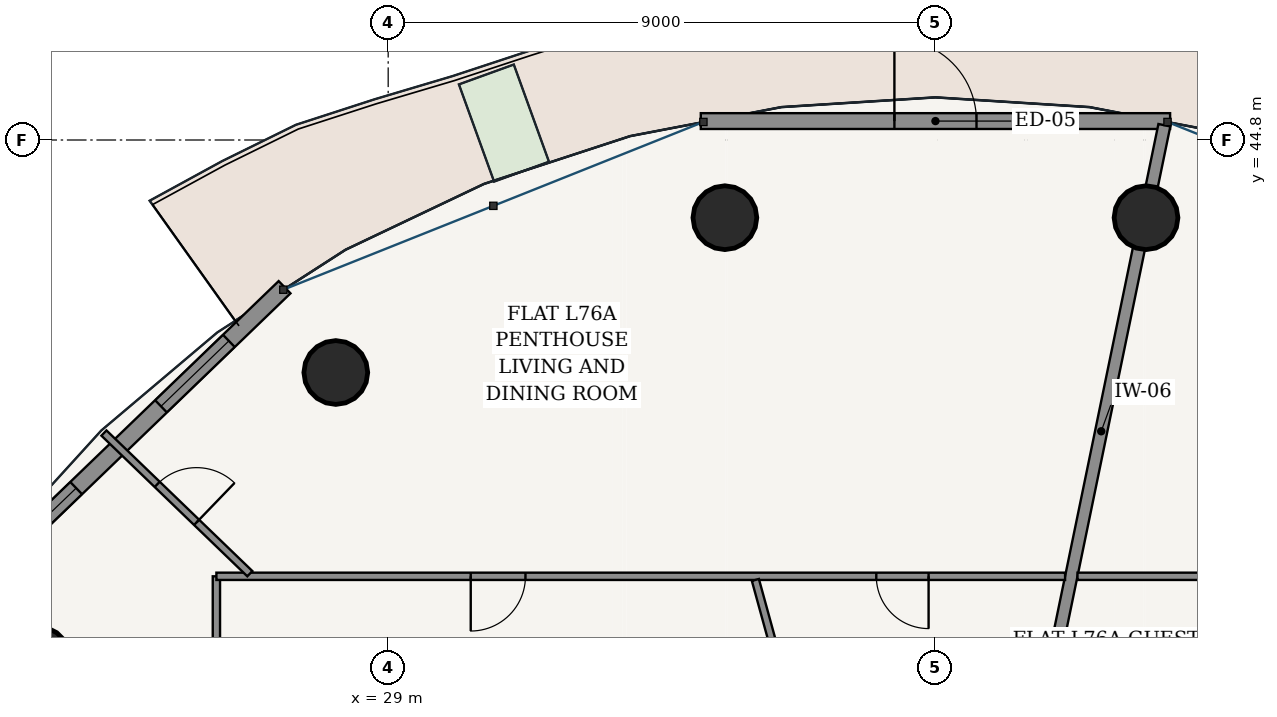
"""IFC4 building model, lengths in metres.
Left out: names, types, materials, properties, quantities, classifications, styles, units other than length and angle.
Written with IfcOpenShell. Run it as: python <this file> out.ifc"""

import sys

from ifc_helpers import new_model, si_unit, direction, frame, frame_2d, origin, origin_2d, place, context, subcontext, project, spatial, rectangle, hollow_circle, extrude, source, transform, mapped, element, fill, save


model = new_model("IFC4")
c1 = context("Model", 3, precision=1e-05, world=origin(), true_north=direction((-0.2419218956, 0.970295726276)))
c2 = subcontext(c1, "Body", "Model", "MODEL_VIEW")
j1 = project(units=[si_unit("LENGTHUNIT", "METRE"), si_unit("PLANEANGLEUNIT", "RADIAN")], contexts=[c1])
p1 = place(None, origin())
s1 = spatial("IfcSite", under=j1, at=p1, CompositionType="ELEMENT")
p2 = place(p1, origin())
s2 = spatial("IfcBuilding", under=s1, at=p2, CompositionType="ELEMENT")
p3 = place(p2, frame((0.0, 0.0, 289.45)))
s3 = spatial("IfcBuildingStorey", under=s2, at=p3, CompositionType="ELEMENT", Elevation=289.45)
for number, where, z_axis, x_axis in (
    (1, (41.463, 43.522, 0.0), (0.0, 0.0, 1.0), (1.0, 0.0, 0.0)),
    (2, (34.537, 43.522, 0.0), (0.0, 0.0, 1.0), (1.0, 0.0, 0.0)),
    (3, (28.139, 40.977, 0.0), (0.0, 0.0, 1.0), (1.0, 0.0, 0.0)),
    (4, (23.241, 36.272, 0.0), (0.0, 0.0, 1.0), (1.0, 0.0, 0.0)),
):
    element("IfcColumn", number, at=place(p3, frame(where, z_axis=z_axis, x_axis=x_axis)), inside=s3, PredefinedType="COLUMN", context=c2, shape_type="SweptSolid", body=[
        extrude(hollow_circle(Radius=0.525, WallThickness=0.035, at=origin_2d()), origin(), (0.0, 0.0, 1.0), 3.75),
    ])
p4 = place(p3, frame((41.859, 45.111, 0.0), z_axis=(0.0, 0.0, 1.0), x_axis=(-1.0, 0.0, 0.0)))
e5 = element("IfcWall", 5, at=p4, inside=s3, PredefinedType="SOLIDWALL", context=c2, shape_type="SweptSolid", body=[
    extrude(rectangle(XDim=7.718, YDim=0.26, at=frame_2d((3.859, 0.0))), origin(), (0.0, 0.0, 1.0), 3.49),
])
p5 = place(p4, frame((3.184, 0.0, 0.0)))
e6 = element("IfcOpeningElement", 6, at=p5, cuts=e5, PredefinedType="OPENING", context=c2, shape_type="SweptSolid", body=[
    extrude(rectangle(XDim=1.35, YDim=2.2, at=frame_2d((0.675, 1.1))), frame((0.0, 0.14, 0.0), z_axis=(0.0, -1.0, 0.0), x_axis=(1.0, 0.0, 0.0)), (0.0, 0.0, 1.0), 0.28),
])
p6 = place(p3, frame((27.296, 42.379, 0.0), z_axis=(0.0, 0.0, 1.0), x_axis=(-0.719979309073, -0.693995529169, 0.0)))
e7 = element("IfcWall", 7, at=p6, inside=s3, PredefinedType="SOLIDWALL", context=c2, shape_type="SweptSolid", body=[
    extrude(rectangle(XDim=7.583, YDim=0.28, at=frame_2d((3.791, 0.0))), origin(), (0.0, 0.0, 1.0), 3.49),
])
p7 = place(p6, frame((1.272, 0.0, 0.85)))
e8 = element("IfcOpeningElement", 8, at=p7, cuts=e7, PredefinedType="OPENING", context=c2, shape_type="SweptSolid", body=[
    extrude(rectangle(XDim=1.55, YDim=1.95, at=frame_2d((0.775, 0.975))), frame((0.0, 0.15, 0.0), z_axis=(0.0, -1.0, 0.0), x_axis=(1.0, 0.0, 0.0)), (0.0, 0.0, 1.0), 0.3),
])
p8 = place(p6, frame((4.76, 0.0, 0.85)))
e9 = element("IfcOpeningElement", 9, at=p8, cuts=e7, PredefinedType="OPENING", context=c2, shape_type="SweptSolid", body=[
    extrude(rectangle(XDim=1.55, YDim=1.95, at=frame_2d((0.775, 0.975))), frame((0.0, 0.15, 0.0), z_axis=(0.0, -1.0, 0.0), x_axis=(1.0, 0.0, 0.0)), (0.0, 0.0, 1.0), 0.3),
])
p9 = place(p3, frame((39.688, 34.977, 0.0), z_axis=(0.0, 0.0, 1.0), x_axis=(0.202091890364, 0.979366564596, 0.0)))
e10 = element("IfcWall", 10, at=p9, inside=s3, PredefinedType="PARTITIONING", context=c2, shape_type="SweptSolid", body=[
    extrude(rectangle(XDim=10.278, YDim=0.2, at=frame_2d((5.139, 0.0))), origin(), (0.0, 0.0, 1.0), 2.575),
])
p10 = place(p3, frame((26.175, 34.01, 0.0), z_axis=(0.0, 0.0, 1.0), x_axis=(0.0, 1.0, 0.0)))
e11 = element("IfcWall", 11, at=p10, inside=s3, PredefinedType="PARTITIONING", context=c2, shape_type="SweptSolid", body=[
    extrude(rectangle(XDim=3.615, YDim=0.12, at=frame_2d((1.808, 0.0))), origin(), (0.0, 0.0, 1.0), 3.015),
])
p11 = place(p3, frame((26.175, 37.625, 0.0), z_axis=(0.0, 0.0, 1.0), x_axis=(1.0, 0.0, 0.0)))
e12 = element("IfcWall", 12, at=p11, inside=s3, PredefinedType="PARTITIONING", context=c2, shape_type="SweptSolid", body=[
    extrude(rectangle(XDim=13.957, YDim=0.12, at=frame_2d((6.979, 0.0))), origin(), (0.0, 0.0, 1.0), 3.015),
])
p12 = place(p11, frame((10.852, 0.0, 0.0)))
e13 = element("IfcOpeningElement", 13, at=p12, cuts=e12, PredefinedType="OPENING", context=c2, shape_type="SweptSolid", body=[
    extrude(rectangle(XDim=0.86, YDim=2.15, at=frame_2d((0.43, 1.075))), frame((0.0, 0.07, 0.0), z_axis=(0.0, -1.0, 0.0), x_axis=(1.0, 0.0, 0.0)), (0.0, 0.0, 1.0), 0.14),
])
p13 = place(p11, frame((4.183, 0.0, 0.0)))
e14 = element("IfcOpeningElement", 14, at=p13, cuts=e12, PredefinedType="OPENING", context=c2, shape_type="SweptSolid", body=[
    extrude(rectangle(XDim=0.9, YDim=2.15, at=frame_2d((0.45, 1.075))), frame((0.0, 0.07, 0.0), z_axis=(0.0, -1.0, 0.0), x_axis=(1.0, 0.0, 0.0)), (0.0, 0.0, 1.0), 0.14),
])
p14 = place(p3, frame((26.725, 37.668, 0.0), z_axis=(0.0, 0.0, 1.0), x_axis=(-0.719954096891, 0.694021684366, 0.0)))
e15 = element("IfcWall", 15, at=p14, inside=s3, PredefinedType="PARTITIONING", context=c2, shape_type="SweptSolid", body=[
    extrude(rectangle(XDim=3.333, YDim=0.12, at=frame_2d((1.667, 0.0))), origin(), (0.0, 0.0, 1.0), 3.121),
])
p15 = place(p14, frame((1.216, 0.0, 0.0)))
e16 = element("IfcOpeningElement", 16, at=p15, cuts=e15, PredefinedType="OPENING", context=c2, shape_type="SweptSolid", body=[
    extrude(rectangle(XDim=0.9, YDim=2.15, at=frame_2d((0.45, 1.075))), frame((0.0, 0.07, 0.0), z_axis=(0.0, -1.0, 0.0), x_axis=(1.0, 0.0, 0.0)), (0.0, 0.0, 1.0), 0.14),
])
p16 = place(p3, frame((35.751, 34.977, 0.0), z_axis=(0.0, 0.0, 1.0), x_axis=(-0.26521778697, 0.964188532122, 0.0)))
e17 = element("IfcWall", 17, at=p16, inside=s3, PredefinedType="PARTITIONING", context=c2, shape_type="SweptSolid", body=[
    extrude(rectangle(XDim=2.684, YDim=0.12, at=frame_2d((1.342, 0.0))), origin(), (0.0, 0.0, 1.0), 2.575),
])
p17 = place(p3, frame((40.336, 37.625, 0.0), z_axis=(0.0, 0.0, 1.0), x_axis=(1.0, 0.0, 0.0)))
e18 = element("IfcWall", 18, at=p17, inside=s3, PredefinedType="PARTITIONING", context=c2, shape_type="SweptSolid", body=[
    extrude(rectangle(XDim=9.489, YDim=0.12, at=frame_2d((4.745, 0.0))), origin(), (0.0, 0.0, 1.0), 3.015),
])
m1 = source(origin(), c2, "Body", "SweptSolid", [
    extrude(rectangle(XDim=1.35, YDim=2.2, at=frame_2d((0.675, 1.1))), frame((0.0, 0.025, 0.0), z_axis=(0.0, -1.0, 0.0), x_axis=(1.0, 0.0, 0.0)), (0.0, 0.0, 1.0), 0.05),
])
p18 = place(p5, frame((1.35, 0.0, 0.0), z_axis=(0.0, 0.0, 1.0), x_axis=(-1.0, 0.0, 0.0)))
e19 = element("IfcDoor", 19, at=p18, inside=s3, OperationType="SINGLE_SWING_LEFT", PredefinedType="DOOR", context=c2, shape_type="MappedRepresentation", body=[
    mapped(m1, transform((0.0, 0.0, 0.0), scale=1.0)),
])
fill(e6, e19)
m2 = source(origin(), c2, "Body", "SweptSolid", [
    extrude(rectangle(XDim=1.55, YDim=1.95, at=frame_2d((0.775, 0.975))), frame((0.0, 0.03, 0.0), z_axis=(0.0, -1.0, 0.0), x_axis=(1.0, 0.0, 0.0)), (0.0, 0.0, 1.0), 0.06),
])
p19 = place(p7, origin())
e20 = element("IfcWindow", 20, at=p19, inside=s3, PartitioningType="SINGLE_PANEL", PredefinedType="WINDOW", context=c2, shape_type="MappedRepresentation", body=[
    mapped(m2, transform((0.0, 0.0, 0.0), scale=1.0)),
])
fill(e8, e20)
p20 = place(p8, origin())
e21 = element("IfcWindow", 21, at=p20, inside=s3, PartitioningType="SINGLE_PANEL", PredefinedType="WINDOW", context=c2, shape_type="MappedRepresentation", body=[
    mapped(m2, transform((0.0, 0.0, 0.0), scale=1.0)),
])
fill(e9, e21)
m3 = source(origin(), c2, "Body", "SweptSolid", [
    extrude(rectangle(XDim=0.9, YDim=2.15, at=frame_2d((0.45, 1.075))), frame((0.0, 0.025, 0.0), z_axis=(0.0, -1.0, 0.0), x_axis=(1.0, 0.0, 0.0)), (0.0, 0.0, 1.0), 0.05),
])
p21 = place(p15, frame((0.9, 0.0, 0.0), z_axis=(0.0, 0.0, 1.0), x_axis=(-1.0, 0.0, 0.0)))
e22 = element("IfcDoor", 22, at=p21, inside=s3, OperationType="SINGLE_SWING_RIGHT", PredefinedType="DOOR", context=c2, shape_type="MappedRepresentation", body=[
    mapped(m3, transform((0.0, 0.0, 0.0), scale=1.0)),
])
fill(e16, e22)
m4 = source(origin(), c2, "Body", "SweptSolid", [
    extrude(rectangle(XDim=0.86, YDim=2.15, at=frame_2d((0.43, 1.075))), frame((0.0, 0.025, 0.0), z_axis=(0.0, -1.0, 0.0), x_axis=(1.0, 0.0, 0.0)), (0.0, 0.0, 1.0), 0.05),
])
p22 = place(p12, frame((0.86, 0.0, 0.0), z_axis=(0.0, 0.0, 1.0), x_axis=(-1.0, 0.0, 0.0)))
e23 = element("IfcDoor", 23, at=p22, inside=s3, OperationType="SINGLE_SWING_LEFT", PredefinedType="DOOR", context=c2, shape_type="MappedRepresentation", body=[
    mapped(m4, transform((0.0, 0.0, 0.0), scale=1.0)),
])
fill(e13, e23)
p23 = place(p13, frame((0.9, 0.0, 0.0), z_axis=(0.0, 0.0, 1.0), x_axis=(-1.0, 0.0, 0.0)))
e24 = element("IfcDoor", 24, at=p23, inside=s3, OperationType="SINGLE_SWING_RIGHT", PredefinedType="DOOR", context=c2, shape_type="MappedRepresentation", body=[
    mapped(m3, transform((0.0, 0.0, 0.0), scale=1.0)),
])
fill(e14, e24)
save(model, sys.argv[1])
